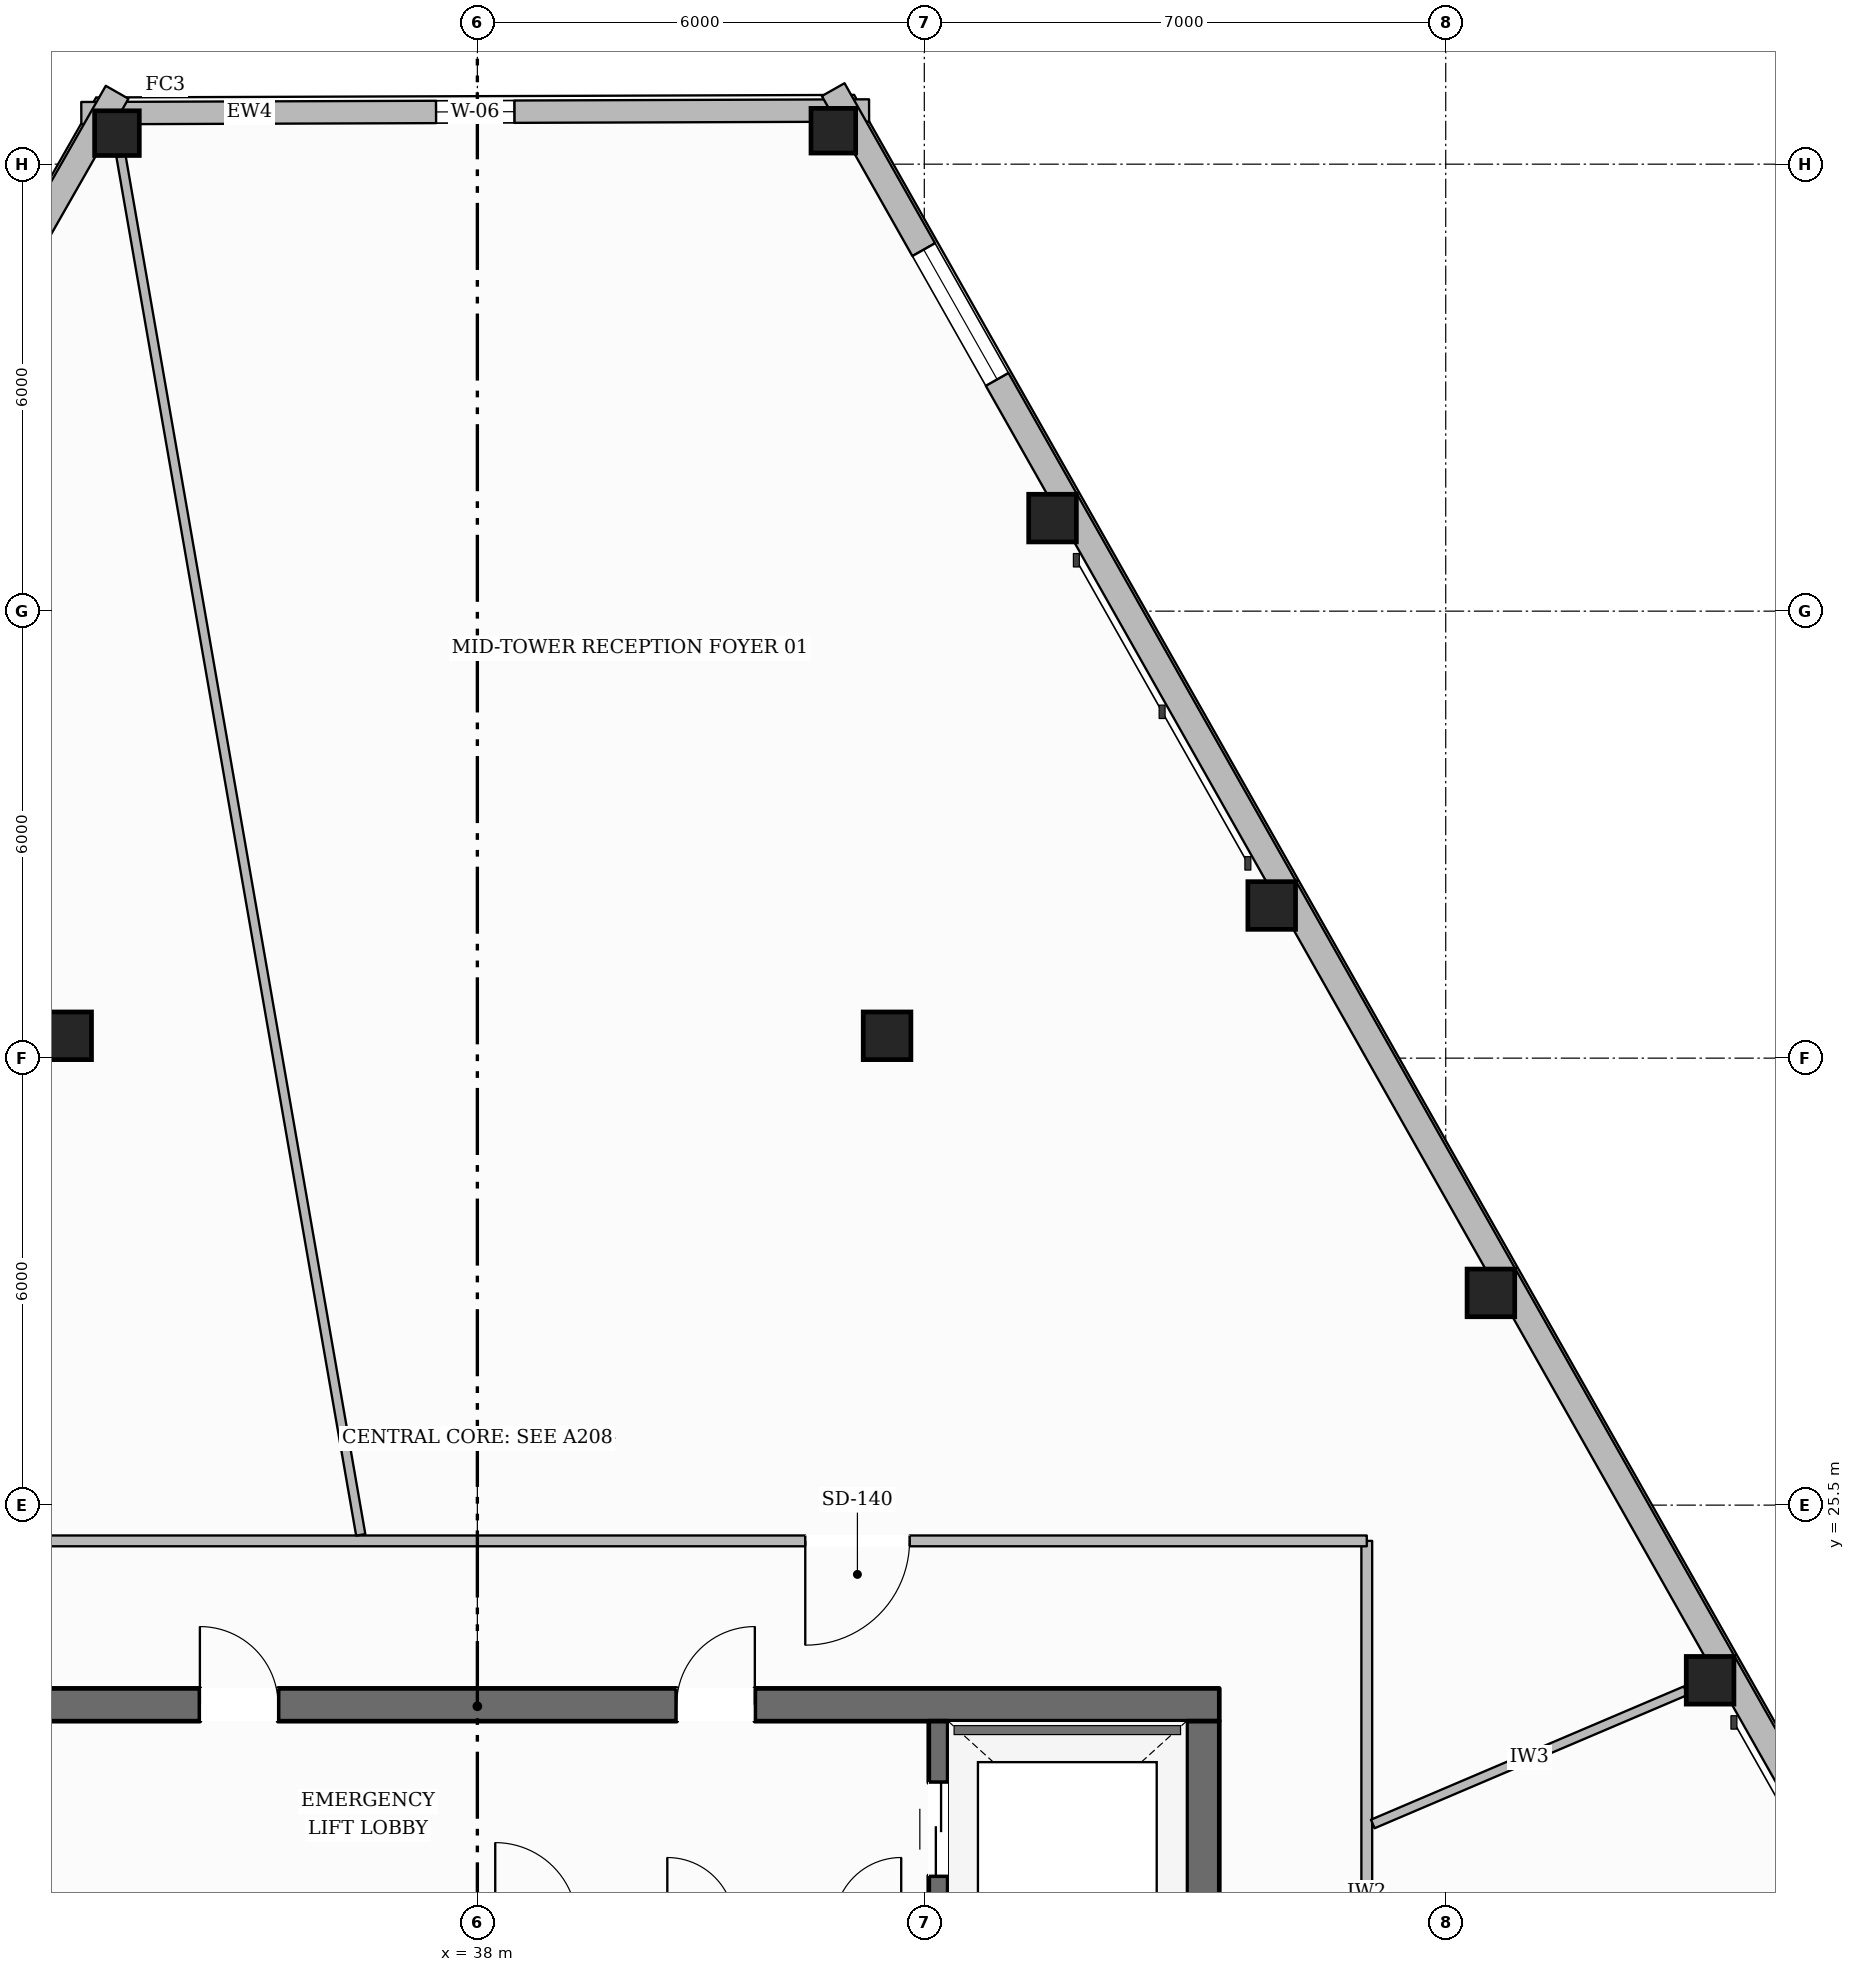
"""IFC4 building model, lengths in metres.
Left out: names, types, materials, properties, quantities, classifications, styles, units other than length and angle.
Written with IfcOpenShell. Run it as: python <this file> out.ifc"""

import sys

from ifc_helpers import new_model, si_unit, direction, frame, frame_2d, origin, origin_2d, place, context, subcontext, project, spatial, rectangle, hollow_rectangle, extrude, element, fill, save


model = new_model("IFC4")
c1 = context("Model", 3, precision=1e-05, world=origin(), true_north=direction((0.0, 1.0)))
c2 = subcontext(c1, "Body", "Model", "MODEL_VIEW")
j1 = project(units=[si_unit("LENGTHUNIT", "METRE"), si_unit("PLANEANGLEUNIT", "RADIAN")], contexts=[c1])
p1 = place(None, origin())
s1 = spatial("IfcSite", under=j1, at=p1, CompositionType="ELEMENT")
p2 = place(p1, origin())
s2 = spatial("IfcBuilding", under=s1, at=p2, CompositionType="ELEMENT")
p3 = place(p2, frame((0.0, 0.0, 160.0)))
s3 = spatial("IfcBuildingStorey", under=s2, at=p3, CompositionType="ELEMENT", Elevation=160.0)
p4 = place(p3, frame((28.04, 22.82, 0.0), z_axis=(0.0, 0.0, 1.0), x_axis=(1.0, 0.0, 0.0)))
e1 = element("IfcWall", 1, at=p4, inside=s3, PredefinedType="SOLIDWALL", context=c2, shape_type="SweptSolid", body=[
    extrude(rectangle(XDim=19.92, YDim=0.44, at=frame_2d((9.96, 0.0))), origin(), (0.0, 0.0, 1.0), 4.75),
])
p5 = place(p4, frame((6.235, 0.0, 0.0)))
e2 = element("IfcOpeningElement", 2, at=p5, cuts=e1, PredefinedType="OPENING", context=c2, shape_type="SweptSolid", body=[
    extrude(rectangle(XDim=1.05, YDim=2.15, at=frame_2d((0.525, 1.075))), frame((0.0, 0.23, 0.0), z_axis=(0.0, -1.0, 0.0), x_axis=(1.0, 0.0, 0.0)), (0.0, 0.0, 1.0), 0.46),
])
p6 = place(p4, frame((12.635, 0.0, 0.0)))
e3 = element("IfcOpeningElement", 3, at=p6, cuts=e1, PredefinedType="OPENING", context=c2, shape_type="SweptSolid", body=[
    extrude(rectangle(XDim=1.05, YDim=2.15, at=frame_2d((0.525, 1.075))), frame((0.0, 0.23, 0.0), z_axis=(0.0, -1.0, 0.0), x_axis=(1.0, 0.0, 0.0)), (0.0, 0.0, 1.0), 0.46),
])
p7 = place(p3, frame((47.74, 9.6, 0.0), z_axis=(0.0, 0.0, 1.0), x_axis=(0.0, 1.0, 0.0)))
e4 = element("IfcWall", 4, at=p7, inside=s3, PredefinedType="SOLIDWALL", context=c2, shape_type="SweptSolid", body=[
    extrude(rectangle(XDim=13.0, YDim=0.44, at=frame_2d((6.5, 0.0))), origin(), (0.0, 0.0, 1.0), 4.75),
])
p8 = place(p7, frame((0.2, 0.0, 0.0)))
e5 = element("IfcOpeningElement", 5, at=p8, cuts=e4, PredefinedType="OPENING", context=c2, shape_type="SweptSolid", body=[
    extrude(rectangle(XDim=1.1, YDim=2.15, at=frame_2d((0.55, 1.075))), frame((0.0, 0.23, 0.0), z_axis=(0.0, -1.0, 0.0), x_axis=(1.0, 0.0, 0.0)), (0.0, 0.0, 1.0), 0.46),
])
p9 = place(p7, frame((8.4, 0.0, 0.0)))
e6 = element("IfcOpeningElement", 6, at=p9, cuts=e4, PredefinedType="OPENING", context=c2, shape_type="SweptSolid", body=[
    extrude(rectangle(XDim=0.9, YDim=2.1, at=frame_2d((0.45, 1.05))), frame((0.0, 0.23, 0.0), z_axis=(0.0, -1.0, 0.0), x_axis=(1.0, 0.0, 0.0)), (0.0, 0.0, 1.0), 0.46),
])
p10 = place(p3, frame((44.19, 9.6, 0.0), z_axis=(0.0, 0.0, 1.0), x_axis=(0.0, 1.0, 0.0)))
e7 = element("IfcWall", 7, at=p10, inside=s3, PredefinedType="SHEAR", context=c2, shape_type="SweptSolid", body=[
    extrude(rectangle(XDim=13.0, YDim=0.26, at=frame_2d((6.5, 0.0))), origin(), (0.0, 0.0, 1.0), 4.75),
])
p11 = place(p10, frame((10.925, 0.0, 0.0)))
e8 = element("IfcOpeningElement", 8, at=p11, cuts=e7, PredefinedType="OPENING", context=c2, shape_type="SweptSolid", body=[
    extrude(rectangle(XDim=1.25, YDim=2.25, at=frame_2d((0.625, 1.125))), frame((0.0, 0.14, 0.0), z_axis=(0.0, -1.0, 0.0), x_axis=(1.0, 0.0, 0.0)), (0.0, 0.0, 1.0), 0.28),
])
p12 = place(p3, frame((33.162, 43.917, 0.0), z_axis=(0.0, 0.0, 1.0), x_axis=(1.0, 0.0, 0.0)))
e9 = element("IfcColumn", 9, at=p12, inside=s3, PredefinedType="COLUMN", context=c2, shape_type="SweptSolid", body=[
    extrude(hollow_rectangle(XDim=0.6, YDim=0.6, WallThickness=0.028, at=origin_2d()), origin(), (0.0, 0.0, 1.0), 4.75),
])
for number, where, z_axis, x_axis in (
    (10, (54.549, 23.149, 0.0), (0.0, 0.0, 1.0), (1.0, 0.0, 0.0)),
    (11, (51.606, 28.349, 0.0), (0.0, 0.0, 1.0), (1.0, 0.0, 0.0)),
    (12, (48.664, 33.549, 0.0), (0.0, 0.0, 1.0), (1.0, 0.0, 0.0)),
    (13, (45.721, 38.749, 0.0), (0.0, 0.0, 1.0), (1.0, 0.0, 0.0)),
):
    element("IfcColumn", number, at=place(p3, frame(where, z_axis=z_axis, x_axis=x_axis)), inside=s3, PredefinedType="COLUMN", context=c2, shape_type="SweptSolid", body=[
        extrude(hollow_rectangle(XDim=0.64, YDim=0.64, WallThickness=0.028, at=origin_2d()), origin(), (0.0, 0.0, 1.0), 4.75),
    ])
p13 = place(p3, frame((42.779, 43.949, 0.0), z_axis=(0.0, 0.0, 1.0), x_axis=(1.0, 0.0, 0.0)))
e14 = element("IfcColumn", 14, at=p13, inside=s3, PredefinedType="COLUMN", context=c2, shape_type="SweptSolid", body=[
    extrude(hollow_rectangle(XDim=0.6, YDim=0.6, WallThickness=0.028, at=origin_2d()), origin(), (0.0, 0.0, 1.0), 4.75),
])
for number, where, z_axis, x_axis in (
    (15, (32.5, 31.8, 0.0), (0.0, 0.0, 1.0), (1.0, 0.0, 0.0)),
    (16, (43.5, 31.8, 0.0), (0.0, 0.0, 1.0), (1.0, 0.0, 0.0)),
):
    element("IfcColumn", number, at=place(p3, frame(where, z_axis=z_axis, x_axis=x_axis)), inside=s3, PredefinedType="COLUMN", context=c2, shape_type="SweptSolid", body=[
        extrude(hollow_rectangle(XDim=0.64, YDim=0.64, WallThickness=0.028, at=origin_2d()), origin(), (0.0, 0.0, 1.0), 4.75),
    ])
p14 = place(p3, frame((32.683, 44.185, 0.0), z_axis=(0.0, 0.0, 1.0), x_axis=(0.9999942421, 0.003393488933, 0.0)))
e17 = element("IfcWall", 17, at=p14, inside=s3, PredefinedType="STANDARD", context=c2, shape_type="SweptSolid", body=[
    extrude(rectangle(XDim=10.576, YDim=0.3, at=frame_2d((5.288, 0.0))), origin(), (0.0, 0.0, 1.0), 4.282),
])
p15 = place(p14, frame((4.763, 0.0, 0.65)))
e18 = element("IfcOpeningElement", 18, at=p15, cuts=e17, PredefinedType="OPENING", context=c2, shape_type="SweptSolid", body=[
    extrude(rectangle(XDim=1.05, YDim=1.7, at=frame_2d((0.525, 0.85))), frame((0.0, 0.16, 0.0), z_axis=(0.0, -1.0, 0.0), x_axis=(1.0, 0.0, 0.0)), (0.0, 0.0, 1.0), 0.32),
])
p16 = place(p3, frame((14.827, 12.314, 0.0), z_axis=(0.0, 0.0, 1.0), x_axis=(0.495417756307, 0.868654849026, 0.0)))
e19 = element("IfcWall", 19, at=p16, inside=s3, PredefinedType="STANDARD", context=c2, shape_type="SweptSolid", body=[
    extrude(rectangle(XDim=37.012, YDim=0.35, at=frame_2d((18.506, 0.0))), origin(), (0.0, 0.0, 1.0), 4.282),
])
p17 = place(p16, frame((32.53, 0.0, 0.65)))
e20 = element("IfcOpeningElement", 20, at=p17, cuts=e19, PredefinedType="OPENING", context=c2, shape_type="SweptSolid", body=[
    extrude(rectangle(XDim=2.0, YDim=2.25, at=frame_2d((1.0, 1.125))), frame((0.0, 0.185, 0.0), z_axis=(0.0, -1.0, 0.0), x_axis=(1.0, 0.0, 0.0)), (0.0, 0.0, 1.0), 0.37),
])
p18 = place(p16, frame((2.478, 0.0, 0.65)))
e21 = element("IfcOpeningElement", 21, at=p18, cuts=e19, PredefinedType="OPENING", context=c2, shape_type="SweptSolid", body=[
    extrude(rectangle(XDim=2.0, YDim=2.25, at=frame_2d((1.0, 1.125))), frame((0.0, 0.185, 0.0), z_axis=(0.0, -1.0, 0.0), x_axis=(1.0, 0.0, 0.0)), (0.0, 0.0, 1.0), 0.37),
])
p19 = place(p3, frame((42.777, 44.5, 0.0), z_axis=(0.0, 0.0, 1.0), x_axis=(0.492483231086, -0.870321933022, 0.0)))
e22 = element("IfcWall", 22, at=p19, inside=s3, PredefinedType="STANDARD", context=c2, shape_type="SweptSolid", body=[
    extrude(rectangle(XDim=36.803, YDim=0.35, at=frame_2d((18.401, 0.0))), origin(), (0.0, 0.0, 1.0), 4.282),
])
p20 = place(p19, frame((32.343, 0.0, 0.65)))
e23 = element("IfcOpeningElement", 23, at=p20, cuts=e22, PredefinedType="OPENING", context=c2, shape_type="SweptSolid", body=[
    extrude(rectangle(XDim=2.0, YDim=2.25, at=frame_2d((1.0, 1.125))), frame((0.0, 0.185, 0.0), z_axis=(0.0, -1.0, 0.0), x_axis=(1.0, 0.0, 0.0)), (0.0, 0.0, 1.0), 0.37),
])
p21 = place(p19, frame((2.468, 0.0, 0.65)))
e24 = element("IfcOpeningElement", 24, at=p21, cuts=e22, PredefinedType="OPENING", context=c2, shape_type="SweptSolid", body=[
    extrude(rectangle(XDim=2.0, YDim=2.25, at=frame_2d((1.0, 1.125))), frame((0.0, 0.185, 0.0), z_axis=(0.0, -1.0, 0.0), x_axis=(1.0, 0.0, 0.0)), (0.0, 0.0, 1.0), 0.37),
])
p22 = place(p3, frame((49.94, 7.18, 0.0), z_axis=(0.0, 0.0, 1.0), x_axis=(0.0, 1.0, 0.0)))
e25 = element("IfcWall", 25, at=p22, inside=s3, PredefinedType="PARTITIONING", context=c2, shape_type="SweptSolid", body=[
    extrude(rectangle(XDim=17.84, YDim=0.145, at=frame_2d((8.92, 0.0))), origin(), (0.0, 0.0, 1.0), 4.489),
])
p23 = place(p22, frame((6.756, 0.0, 0.0)))
e26 = element("IfcOpeningElement", 26, at=p23, cuts=e25, PredefinedType="OPENING", context=c2, shape_type="SweptSolid", body=[
    extrude(rectangle(XDim=1.4, YDim=2.2, at=frame_2d((0.7, 1.1))), frame((0.0, 0.083, 0.0), z_axis=(0.0, -1.0, 0.0), x_axis=(1.0, 0.0, 0.0)), (0.0, 0.0, 1.0), 0.165),
])
p24 = place(p3, frame((49.94, 25.02, 0.0), z_axis=(0.0, 0.0, 1.0), x_axis=(-1.0, 0.0, 0.0)))
e27 = element("IfcWall", 27, at=p24, inside=s3, PredefinedType="PARTITIONING", context=c2, shape_type="SweptSolid", body=[
    extrude(rectangle(XDim=23.88, YDim=0.145, at=frame_2d((11.94, 0.0))), origin(), (0.0, 0.0, 1.0), 4.75),
])
p25 = place(p24, frame((6.138, 0.0, 0.0)))
e28 = element("IfcOpeningElement", 28, at=p25, cuts=e27, PredefinedType="OPENING", context=c2, shape_type="SweptSolid", body=[
    extrude(rectangle(XDim=1.4, YDim=2.2, at=frame_2d((0.7, 1.1))), frame((0.0, 0.083, 0.0), z_axis=(0.0, -1.0, 0.0), x_axis=(1.0, 0.0, 0.0)), (0.0, 0.0, 1.0), 0.165),
])
p26 = place(p24, frame((18.098, 0.0, 0.0)))
e29 = element("IfcOpeningElement", 29, at=p26, cuts=e27, PredefinedType="OPENING", context=c2, shape_type="SweptSolid", body=[
    extrude(rectangle(XDim=1.02, YDim=2.15, at=frame_2d((0.51, 1.075))), frame((0.0, 0.083, 0.0), z_axis=(0.0, -1.0, 0.0), x_axis=(1.0, 0.0, 0.0)), (0.0, 0.0, 1.0), 0.165),
])
p27 = place(p3, frame((50.021, 21.22, 0.0), z_axis=(0.0, 0.0, 1.0), x_axis=(0.920036117829, 0.391833564016, 0.0)))
e30 = element("IfcWall", 30, at=p27, inside=s3, PredefinedType="PARTITIONING", context=c2, shape_type="SweptSolid", body=[
    extrude(rectangle(XDim=4.565, YDim=0.125, at=frame_2d((2.283, 0.0))), origin(), (0.0, 0.0, 1.0), 4.75),
])
p28 = place(p3, frame((36.435, 25.101, 0.0), z_axis=(0.0, 0.0, 1.0), x_axis=(-0.171366403796, 0.985207366827, 0.0)))
e31 = element("IfcWall", 31, at=p28, inside=s3, PredefinedType="PARTITIONING", context=c2, shape_type="SweptSolid", body=[
    extrude(rectangle(XDim=18.786, YDim=0.125, at=frame_2d((9.393, 0.0))), origin(), (0.0, 0.0, 1.0), 4.291),
])
p29 = place(p21, origin())
e32 = element("IfcWindow", 32, at=p29, inside=s3, PartitioningType="SINGLE_PANEL", PredefinedType="WINDOW", context=c2, shape_type="SweptSolid", body=[
    extrude(rectangle(XDim=2.0, YDim=2.25, at=frame_2d((1.0, 1.125))), frame((0.0, 0.03, 0.0), z_axis=(0.0, -1.0, 0.0), x_axis=(1.0, 0.0, 0.0)), (0.0, 0.0, 1.0), 0.06),
])
fill(e24, e32)
p30 = place(p15, origin())
e33 = element("IfcWindow", 33, at=p30, inside=s3, PartitioningType="SINGLE_PANEL", PredefinedType="WINDOW", context=c2, shape_type="SweptSolid", body=[
    extrude(rectangle(XDim=1.05, YDim=1.7, at=frame_2d((0.525, 0.85))), frame((0.0, 0.03, 0.0), z_axis=(0.0, -1.0, 0.0), x_axis=(1.0, 0.0, 0.0)), (0.0, 0.0, 1.0), 0.06),
])
fill(e18, e33)
p31 = place(p5, origin())
e34 = element("IfcDoor", 34, at=p31, inside=s3, OperationType="SINGLE_SWING_LEFT", PredefinedType="DOOR", context=c2, shape_type="SweptSolid", body=[
    extrude(rectangle(XDim=1.05, YDim=2.15, at=frame_2d((0.525, 1.075))), frame((0.0, 0.025, 0.0), z_axis=(0.0, -1.0, 0.0), x_axis=(1.0, 0.0, 0.0)), (0.0, 0.0, 1.0), 0.05),
])
fill(e2, e34)
p32 = place(p6, origin())
e35 = element("IfcDoor", 35, at=p32, inside=s3, OperationType="SINGLE_SWING_RIGHT", PredefinedType="DOOR", context=c2, shape_type="SweptSolid", body=[
    extrude(rectangle(XDim=1.05, YDim=2.15, at=frame_2d((0.525, 1.075))), frame((0.0, 0.025, 0.0), z_axis=(0.0, -1.0, 0.0), x_axis=(1.0, 0.0, 0.0)), (0.0, 0.0, 1.0), 0.05),
])
fill(e3, e35)
p33 = place(p11, origin())
e36 = element("IfcDoor", 36, at=p33, inside=s3, OperationType="DOUBLE_DOOR_SLIDING", PredefinedType="DOOR", context=c2, shape_type="SweptSolid", body=[
    extrude(rectangle(XDim=1.25, YDim=2.25, at=frame_2d((0.625, 1.125))), frame((0.0, 0.025, 0.0), z_axis=(0.0, -1.0, 0.0), x_axis=(1.0, 0.0, 0.0)), (0.0, 0.0, 1.0), 0.05),
])
fill(e8, e36)
p34 = place(p25, origin())
e37 = element("IfcDoor", 37, at=p34, inside=s3, OperationType="SINGLE_SWING_RIGHT", PredefinedType="DOOR", context=c2, shape_type="SweptSolid", body=[
    extrude(rectangle(XDim=1.4, YDim=2.2, at=frame_2d((0.7, 1.1))), frame((0.0, 0.025, 0.0), z_axis=(0.0, -1.0, 0.0), x_axis=(1.0, 0.0, 0.0)), (0.0, 0.0, 1.0), 0.05),
])
fill(e28, e37)
save(model, sys.argv[1])
